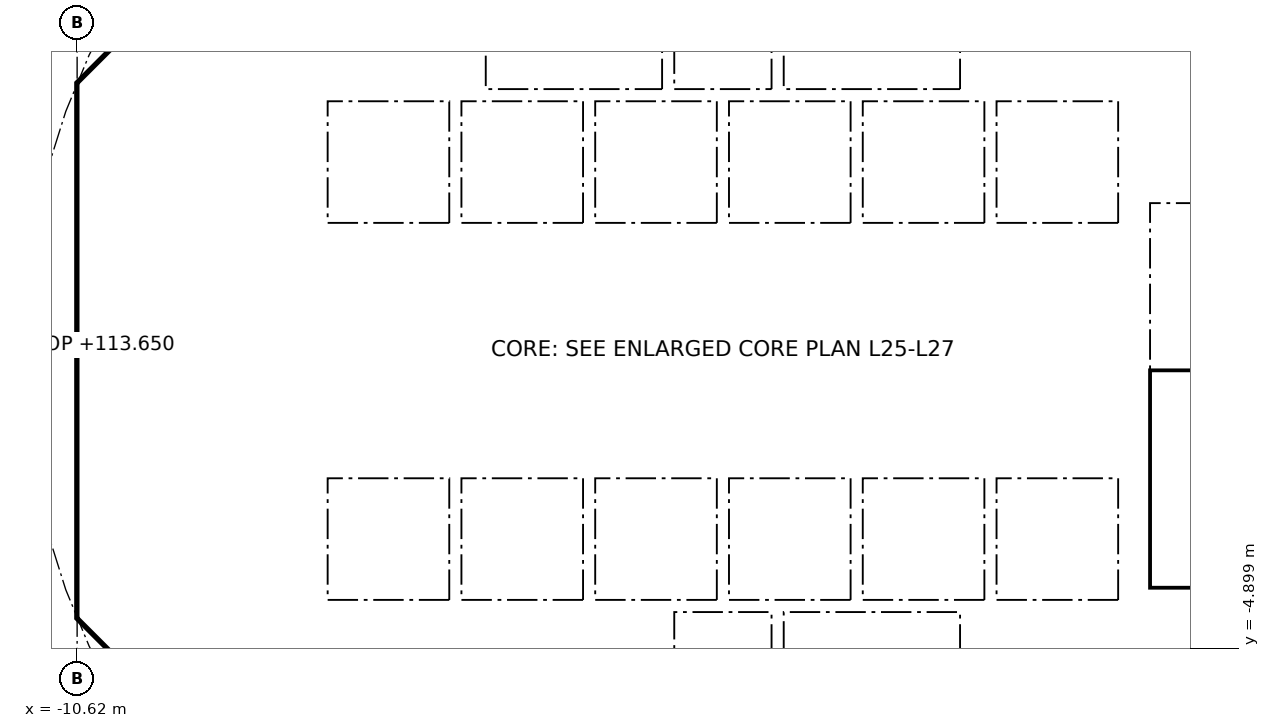
"""IFC4 building model, lengths in metres.
Left out: names, types, materials, properties, quantities, classifications, styles, units other than length and angle.
Written with IfcOpenShell. Run it as: python <this file> out.ifc"""

import sys

from ifc_helpers import new_model, si_unit, direction, frame, frame_2d, origin, place, context, subcontext, project, spatial, polyline, rectangle, outline, extrude, element, fill, save


model = new_model("IFC4")
c1 = context("Model", 3, precision=1e-05, world=origin(), true_north=direction((0.0, 1.0)))
c2 = subcontext(c1, "Body", "Model", "MODEL_VIEW")
j1 = project(units=[si_unit("LENGTHUNIT", "METRE"), si_unit("PLANEANGLEUNIT", "RADIAN")], contexts=[c1])
p1 = place(None, origin())
s1 = spatial("IfcSite", under=j1, at=p1, CompositionType="ELEMENT")
p2 = place(p1, origin())
s2 = spatial("IfcBuilding", under=s1, at=p2, CompositionType="ELEMENT")
p3 = place(p2, frame((0.0, 0.0, 110.3)))
s3 = spatial("IfcBuildingStorey", under=s2, at=p3, CompositionType="ELEMENT", Elevation=110.3)
p4 = place(p3, frame((9.988, 4.613, 0.0), z_axis=(0.0, 0.0, 1.0), x_axis=(-0.707106781187, 0.707106781187, 0.0)))
e1 = element("IfcWall", 1, at=p4, inside=s3, PredefinedType="SHEAR", context=c2, shape_type="SweptSolid", body=[
    extrude(rectangle(XDim=7.602, YDim=0.6, at=frame_2d((3.801, 0.0))), origin(), (0.0, 0.0, 1.0), 3.35),
])
p5 = place(p4, frame((3.201, 0.0, 0.0)))
e2 = element("IfcOpeningElement", 2, at=p5, cuts=e1, PredefinedType="OPENING", context=c2, shape_type="SweptSolid", body=[
    extrude(rectangle(XDim=1.2, YDim=2.1, at=frame_2d((0.6, 1.05))), frame((0.0, 0.31, 0.0), z_axis=(0.0, -1.0, 0.0), x_axis=(1.0, 0.0, 0.0)), (0.0, 0.0, 1.0), 0.62),
])
p6 = place(p3, frame((-4.613, 9.988, 0.0), z_axis=(0.0, 0.0, 1.0), x_axis=(-0.707106781187, -0.707106781187, 0.0)))
e3 = element("IfcWall", 3, at=p6, inside=s3, PredefinedType="SHEAR", context=c2, shape_type="SweptSolid", body=[
    extrude(rectangle(XDim=7.602, YDim=0.6, at=frame_2d((3.801, 0.0))), origin(), (0.0, 0.0, 1.0), 3.35),
])
p7 = place(p6, frame((0.351, 0.0, 0.0)))
e4 = element("IfcOpeningElement", 4, at=p7, cuts=e3, PredefinedType="OPENING", context=c2, shape_type="SweptSolid", body=[
    extrude(rectangle(XDim=1.1, YDim=2.1, at=frame_2d((0.55, 1.05))), frame((0.0, 0.31, 0.0), z_axis=(0.0, -1.0, 0.0), x_axis=(1.0, 0.0, 0.0)), (0.0, 0.0, 1.0), 0.62),
])
p8 = place(p3, frame((-10.325, 3.801, 0.0), z_axis=(0.0, 0.0, 1.0), x_axis=(0.0, -1.0, 0.0)))
e5 = element("IfcWall", 5, at=p8, inside=s3, PredefinedType="SHEAR", context=c2, shape_type="SweptSolid", body=[
    extrude(rectangle(XDim=7.602, YDim=0.6, at=frame_2d((3.801, 0.0))), origin(), (0.0, 0.0, 1.0), 3.35),
])
p9 = place(p8, frame((0.651, 0.0, 0.0)))
e6 = element("IfcOpeningElement", 6, at=p9, cuts=e5, PredefinedType="OPENING", context=c2, shape_type="SweptSolid", body=[
    extrude(rectangle(XDim=1.5, YDim=2.1, at=frame_2d((0.75, 1.05))), frame((0.0, 0.31, 0.0), z_axis=(0.0, -1.0, 0.0), x_axis=(1.0, 0.0, 0.0)), (0.0, 0.0, 1.0), 0.62),
])
p10 = place(p8, frame((5.451, 0.0, 0.0)))
e7 = element("IfcOpeningElement", 7, at=p10, cuts=e5, PredefinedType="OPENING", context=c2, shape_type="SweptSolid", body=[
    extrude(rectangle(XDim=1.5, YDim=2.1, at=frame_2d((0.75, 1.05))), frame((0.0, 0.31, 0.0), z_axis=(0.0, -1.0, 0.0), x_axis=(1.0, 0.0, 0.0)), (0.0, 0.0, 1.0), 0.62),
])
p11 = place(p3, frame((-9.988, -4.613, 0.0), z_axis=(0.0, 0.0, 1.0), x_axis=(0.707106781187, -0.707106781187, 0.0)))
e8 = element("IfcWall", 8, at=p11, inside=s3, PredefinedType="SHEAR", context=c2, shape_type="SweptSolid", body=[
    extrude(rectangle(XDim=7.602, YDim=0.6, at=frame_2d((3.801, 0.0))), origin(), (0.0, 0.0, 1.0), 3.35),
])
p12 = place(p11, frame((6.151, 0.0, 0.0)))
e9 = element("IfcOpeningElement", 9, at=p12, cuts=e8, PredefinedType="OPENING", context=c2, shape_type="SweptSolid", body=[
    extrude(rectangle(XDim=1.1, YDim=2.1, at=frame_2d((0.55, 1.05))), frame((0.0, 0.31, 0.0), z_axis=(0.0, -1.0, 0.0), x_axis=(1.0, 0.0, 0.0)), (0.0, 0.0, 1.0), 0.62),
])
p13 = place(p3, frame((4.613, -9.988, 0.0), z_axis=(0.0, 0.0, 1.0), x_axis=(0.707106781187, 0.707106781187, 0.0)))
e10 = element("IfcWall", 10, at=p13, inside=s3, PredefinedType="SHEAR", context=c2, shape_type="SweptSolid", body=[
    extrude(rectangle(XDim=7.602, YDim=0.6, at=frame_2d((3.801, 0.0))), origin(), (0.0, 0.0, 1.0), 3.35),
])
p14 = place(p13, frame((3.201, 0.0, 0.0)))
e11 = element("IfcOpeningElement", 11, at=p14, cuts=e10, PredefinedType="OPENING", context=c2, shape_type="SweptSolid", body=[
    extrude(rectangle(XDim=1.2, YDim=2.1, at=frame_2d((0.6, 1.05))), frame((0.0, 0.31, 0.0), z_axis=(0.0, -1.0, 0.0), x_axis=(1.0, 0.0, 0.0)), (0.0, 0.0, 1.0), 0.62),
])
p15 = place(p3, frame((-5.8, 4.3, 0.0), z_axis=(0.0, 0.0, 1.0), x_axis=(0.0, 1.0, 0.0)))
e12 = element("IfcWall", 12, at=p15, inside=s3, PredefinedType="PARTITIONING", context=c2, shape_type="SweptSolid", body=[
    extrude(rectangle(XDim=3.927, YDim=0.15, at=frame_2d((1.963, 0.0))), origin(), (0.0, 0.0, 1.0), 3.35),
])
p16 = place(p15, frame((0.413, 0.0, 0.0)))
e13 = element("IfcOpeningElement", 13, at=p16, cuts=e12, PredefinedType="OPENING", context=c2, shape_type="SweptSolid", body=[
    extrude(rectangle(XDim=0.9, YDim=2.1, at=frame_2d((0.45, 1.05))), frame((0.0, 0.085, 0.0), z_axis=(0.0, -1.0, 0.0), x_axis=(1.0, 0.0, 0.0)), (0.0, 0.0, 1.0), 0.17),
])
p17 = place(p15, frame((2.489, 0.0, 0.0)))
e14 = element("IfcOpeningElement", 14, at=p17, cuts=e12, PredefinedType="OPENING", context=c2, shape_type="SweptSolid", body=[
    extrude(rectangle(XDim=0.9, YDim=2.1, at=frame_2d((0.45, 1.05))), frame((0.0, 0.085, 0.0), z_axis=(0.0, -1.0, 0.0), x_axis=(1.0, 0.0, 0.0)), (0.0, 0.0, 1.0), 0.17),
])
p18 = place(p3, frame((4.0, 4.3, 0.0), z_axis=(0.0, 0.0, 1.0), x_axis=(0.0, 1.0, 0.0)))
e15 = element("IfcWall", 15, at=p18, inside=s3, PredefinedType="SOLIDWALL", context=c2, shape_type="SweptSolid", body=[
    extrude(rectangle(XDim=2.2, YDim=0.2, at=frame_2d((1.1, 0.0))), origin(), (0.0, 0.0, 1.0), 3.35),
])
p19 = place(p18, frame((0.55, 0.0, 0.0)))
e16 = element("IfcOpeningElement", 16, at=p19, cuts=e15, PredefinedType="OPENING", context=c2, shape_type="SweptSolid", body=[
    extrude(rectangle(XDim=1.1, YDim=2.1, at=frame_2d((0.55, 1.05))), frame((0.0, 0.11, 0.0), z_axis=(0.0, -1.0, 0.0), x_axis=(1.0, 0.0, 0.0)), (0.0, 0.0, 1.0), 0.22),
])
p20 = place(p3, frame((-4.0, 4.3, 0.0), z_axis=(0.0, 0.0, 1.0), x_axis=(0.0, 1.0, 0.0)))
e17 = element("IfcWall", 17, at=p20, inside=s3, PredefinedType="SOLIDWALL", context=c2, shape_type="SweptSolid", body=[
    extrude(rectangle(XDim=2.2, YDim=0.2, at=frame_2d((1.1, 0.0))), origin(), (0.0, 0.0, 1.0), 3.35),
])
p21 = place(p20, frame((0.55, 0.0, 0.0)))
e18 = element("IfcOpeningElement", 18, at=p21, cuts=e17, PredefinedType="OPENING", context=c2, shape_type="SweptSolid", body=[
    extrude(rectangle(XDim=1.1, YDim=2.1, at=frame_2d((0.55, 1.05))), frame((0.0, 0.11, 0.0), z_axis=(0.0, -1.0, 0.0), x_axis=(1.0, 0.0, 0.0)), (0.0, 0.0, 1.0), 0.22),
])
p22 = place(p3, frame((-6.7, 2.0, 0.0), z_axis=(0.0, 0.0, 1.0), x_axis=(1.0, 0.0, 0.0)))
e19 = element("IfcWall", 19, at=p22, inside=s3, PredefinedType="SOLIDWALL", context=c2, shape_type="SweptSolid", body=[
    extrude(rectangle(XDim=13.4, YDim=0.2, at=frame_2d((6.7, 0.0))), origin(), (0.0, 0.0, 1.0), 3.35),
])
p23 = place(p22, frame((0.65, 0.0, 0.0)))
e20 = element("IfcOpeningElement", 20, at=p23, cuts=e19, PredefinedType="OPENING", context=c2, shape_type="SweptSolid", body=[
    extrude(rectangle(XDim=1.1, YDim=2.1, at=frame_2d((0.55, 1.05))), frame((0.0, 0.11, 0.0), z_axis=(0.0, -1.0, 0.0), x_axis=(1.0, 0.0, 0.0)), (0.0, 0.0, 1.0), 0.22),
])
p24 = place(p22, frame((2.85, 0.0, 0.0)))
e21 = element("IfcOpeningElement", 21, at=p24, cuts=e19, PredefinedType="OPENING", context=c2, shape_type="SweptSolid", body=[
    extrude(rectangle(XDim=1.1, YDim=2.1, at=frame_2d((0.55, 1.05))), frame((0.0, 0.11, 0.0), z_axis=(0.0, -1.0, 0.0), x_axis=(1.0, 0.0, 0.0)), (0.0, 0.0, 1.0), 0.22),
])
p25 = place(p22, frame((5.05, 0.0, 0.0)))
e22 = element("IfcOpeningElement", 22, at=p25, cuts=e19, PredefinedType="OPENING", context=c2, shape_type="SweptSolid", body=[
    extrude(rectangle(XDim=1.1, YDim=2.1, at=frame_2d((0.55, 1.05))), frame((0.0, 0.11, 0.0), z_axis=(0.0, -1.0, 0.0), x_axis=(1.0, 0.0, 0.0)), (0.0, 0.0, 1.0), 0.22),
])
p26 = place(p3, frame((6.7, 4.0, 0.0), z_axis=(0.0, 0.0, 1.0), x_axis=(1.0, 0.0, 0.0)))
e23 = element("IfcWall", 23, at=p26, inside=s3, PredefinedType="SOLIDWALL", context=c2, shape_type="SweptSolid", body=[
    extrude(rectangle(XDim=3.325, YDim=0.2, at=frame_2d((1.662, 0.0))), origin(), (0.0, 0.0, 1.0), 3.35),
])
p27 = place(p26, frame((1.25, 0.0, 0.0)))
e24 = element("IfcOpeningElement", 24, at=p27, cuts=e23, PredefinedType="OPENING", context=c2, shape_type="SweptSolid", body=[
    extrude(rectangle(XDim=1.1, YDim=2.1, at=frame_2d((0.55, 1.05))), frame((0.0, 0.11, 0.0), z_axis=(0.0, -1.0, 0.0), x_axis=(1.0, 0.0, 0.0)), (0.0, 0.0, 1.0), 0.22),
])
p28 = place(p3, frame((-5.8, -8.227, 0.0), z_axis=(0.0, 0.0, 1.0), x_axis=(0.0, 1.0, 0.0)))
e25 = element("IfcWall", 25, at=p28, inside=s3, PredefinedType="PARTITIONING", context=c2, shape_type="SweptSolid", body=[
    extrude(rectangle(XDim=3.927, YDim=0.15, at=frame_2d((1.963, 0.0))), origin(), (0.0, 0.0, 1.0), 3.35),
])
p29 = place(p28, frame((2.615, 0.0, 0.0)))
e26 = element("IfcOpeningElement", 26, at=p29, cuts=e25, PredefinedType="OPENING", context=c2, shape_type="SweptSolid", body=[
    extrude(rectangle(XDim=0.9, YDim=2.1, at=frame_2d((0.45, 1.05))), frame((0.0, 0.085, 0.0), z_axis=(0.0, -1.0, 0.0), x_axis=(1.0, 0.0, 0.0)), (0.0, 0.0, 1.0), 0.17),
])
p30 = place(p28, frame((0.539, 0.0, 0.0)))
e27 = element("IfcOpeningElement", 27, at=p30, cuts=e25, PredefinedType="OPENING", context=c2, shape_type="SweptSolid", body=[
    extrude(rectangle(XDim=0.9, YDim=2.1, at=frame_2d((0.45, 1.05))), frame((0.0, 0.085, 0.0), z_axis=(0.0, -1.0, 0.0), x_axis=(1.0, 0.0, 0.0)), (0.0, 0.0, 1.0), 0.17),
])
p31 = place(p3, frame((4.0, -6.5, 0.0), z_axis=(0.0, 0.0, 1.0), x_axis=(0.0, 1.0, 0.0)))
e28 = element("IfcWall", 28, at=p31, inside=s3, PredefinedType="SOLIDWALL", context=c2, shape_type="SweptSolid", body=[
    extrude(rectangle(XDim=2.2, YDim=0.2, at=frame_2d((1.1, 0.0))), origin(), (0.0, 0.0, 1.0), 3.35),
])
p32 = place(p31, frame((0.55, 0.0, 0.0)))
e29 = element("IfcOpeningElement", 29, at=p32, cuts=e28, PredefinedType="OPENING", context=c2, shape_type="SweptSolid", body=[
    extrude(rectangle(XDim=1.1, YDim=2.1, at=frame_2d((0.55, 1.05))), frame((0.0, 0.11, 0.0), z_axis=(0.0, -1.0, 0.0), x_axis=(1.0, 0.0, 0.0)), (0.0, 0.0, 1.0), 0.22),
])
p33 = place(p3, frame((-4.0, -6.5, 0.0), z_axis=(0.0, 0.0, 1.0), x_axis=(0.0, 1.0, 0.0)))
e30 = element("IfcWall", 30, at=p33, inside=s3, PredefinedType="SOLIDWALL", context=c2, shape_type="SweptSolid", body=[
    extrude(rectangle(XDim=2.2, YDim=0.2, at=frame_2d((1.1, 0.0))), origin(), (0.0, 0.0, 1.0), 3.35),
])
p34 = place(p33, frame((0.65, 0.0, 0.0)))
e31 = element("IfcOpeningElement", 31, at=p34, cuts=e30, PredefinedType="OPENING", context=c2, shape_type="SweptSolid", body=[
    extrude(rectangle(XDim=0.9, YDim=2.1, at=frame_2d((0.45, 1.05))), frame((0.0, 0.11, 0.0), z_axis=(0.0, -1.0, 0.0), x_axis=(1.0, 0.0, 0.0)), (0.0, 0.0, 1.0), 0.22),
])
p35 = place(p3, frame((-6.7, -2.0, 0.0), z_axis=(0.0, 0.0, 1.0), x_axis=(1.0, 0.0, 0.0)))
e32 = element("IfcWall", 32, at=p35, inside=s3, PredefinedType="SOLIDWALL", context=c2, shape_type="SweptSolid", body=[
    extrude(rectangle(XDim=13.4, YDim=0.2, at=frame_2d((6.7, 0.0))), origin(), (0.0, 0.0, 1.0), 3.35),
])
p36 = place(p35, frame((0.65, 0.0, 0.0)))
e33 = element("IfcOpeningElement", 33, at=p36, cuts=e32, PredefinedType="OPENING", context=c2, shape_type="SweptSolid", body=[
    extrude(rectangle(XDim=1.1, YDim=2.1, at=frame_2d((0.55, 1.05))), frame((0.0, 0.11, 0.0), z_axis=(0.0, -1.0, 0.0), x_axis=(1.0, 0.0, 0.0)), (0.0, 0.0, 1.0), 0.22),
])
p37 = place(p35, frame((2.85, 0.0, 0.0)))
e34 = element("IfcOpeningElement", 34, at=p37, cuts=e32, PredefinedType="OPENING", context=c2, shape_type="SweptSolid", body=[
    extrude(rectangle(XDim=1.1, YDim=2.1, at=frame_2d((0.55, 1.05))), frame((0.0, 0.11, 0.0), z_axis=(0.0, -1.0, 0.0), x_axis=(1.0, 0.0, 0.0)), (0.0, 0.0, 1.0), 0.22),
])
p38 = place(p3, origin())
e35 = element("IfcWall", 35, at=p38, inside=s3, PredefinedType="SHEAR", context=c2, shape_type="SweptSolid", body=[
    extrude(outline(polyline([(-10.625, -3.801), (-10.025, -3.801), (-10.025, -4.152), (-9.776, -4.401), (-10.2, -4.825), (-10.625, -4.401), (-10.625, -3.801)])), origin(), (0.0, 0.0, 1.0), 3.35),
])
p39 = place(p3, origin())
e36 = element("IfcWall", 36, at=p39, inside=s3, PredefinedType="SHEAR", context=c2, shape_type="SweptSolid", body=[
    extrude(outline(polyline([(-10.2, 4.825), (-9.776, 4.401), (-10.025, 4.152), (-10.025, 3.801), (-10.625, 3.801), (-10.625, 4.401), (-10.2, 4.825)])), origin(), (0.0, 0.0, 1.0), 3.35),
])
for number, where, z_axis, x_axis in (
    (37, (-10.025, -4.0, 0.0), (0.0, 0.0, 1.0), (1.0, 0.0, 0.0)),
    (38, (-10.025, 4.0, 0.0), (0.0, 0.0, 1.0), (1.0, 0.0, 0.0)),
):
    element("IfcWall", number, at=place(p3, frame(where, z_axis=z_axis, x_axis=x_axis)), inside=s3, PredefinedType="PARTITIONING", context=c2, shape_type="SweptSolid", body=[
        extrude(rectangle(XDim=3.325, YDim=0.2, at=frame_2d((1.662, 0.0))), origin(), (0.0, 0.0, 1.0), 3.35),
    ])
for number, where, z_axis, x_axis in (
    (39, (-0.9, -6.5, 0.0), (0.0, 0.0, 1.0), (0.0, 1.0, 0.0)),
    (40, (0.9, -6.5, 0.0), (0.0, 0.0, 1.0), (0.0, 1.0, 0.0)),
):
    element("IfcWall", number, at=place(p3, frame(where, z_axis=z_axis, x_axis=x_axis)), inside=s3, PredefinedType="SOLIDWALL", context=c2, shape_type="SweptSolid", body=[
        extrude(rectangle(XDim=2.2, YDim=0.2, at=frame_2d((1.1, 0.0))), origin(), (0.0, 0.0, 1.0), 3.35),
    ])
p40 = place(p3, origin())
e41 = element("IfcWall", 41, at=p40, inside=s3, PredefinedType="SOLIDWALL", context=c2, shape_type="SweptSolid", body=[
    extrude(outline(polyline([(-6.7, -2.1), (-6.5, -2.1), (-6.5, -4.1), (-4.5, -4.1), (-4.5, -2.1), (-4.3, -2.1), (-4.3, -4.1), (-2.3, -4.1), (-2.3, -2.1), (-2.1, -2.1), (-2.1, -4.1), (-0.1, -4.1), (-0.1, -2.1), (0.1, -2.1), (0.1, -4.1), (2.1, -4.1), (2.1, -2.1), (2.3, -2.1), (2.3, -4.1), (4.3, -4.1), (4.3, -2.1), (4.5, -2.1), (4.5, -4.1), (6.5, -4.1), (6.5, -2.1), (6.7, -2.1), (6.7, -4.3), (-6.7, -4.3), (-6.7, -2.1)])), origin(), (0.0, 0.0, 1.0), 3.35),
])
for number, where, z_axis, x_axis in (
    (42, (-0.9, 4.3, 0.0), (0.0, 0.0, 1.0), (0.0, 1.0, 0.0)),
    (43, (0.9, 4.3, 0.0), (0.0, 0.0, 1.0), (0.0, 1.0, 0.0)),
):
    element("IfcWall", number, at=place(p3, frame(where, z_axis=z_axis, x_axis=x_axis)), inside=s3, PredefinedType="SOLIDWALL", context=c2, shape_type="SweptSolid", body=[
        extrude(rectangle(XDim=2.2, YDim=0.2, at=frame_2d((1.1, 0.0))), origin(), (0.0, 0.0, 1.0), 3.35),
    ])
p41 = place(p3, origin())
e44 = element("IfcWall", 44, at=p41, inside=s3, PredefinedType="SOLIDWALL", context=c2, shape_type="SweptSolid", body=[
    extrude(outline(polyline([(-6.5, 2.1), (-6.7, 2.1), (-6.7, 4.3), (6.7, 4.3), (6.7, 2.1), (6.5, 2.1), (6.5, 4.1), (4.5, 4.1), (4.5, 2.1), (4.3, 2.1), (4.3, 4.1), (2.3, 4.1), (2.3, 2.1), (2.1, 2.1), (2.1, 4.1), (0.1, 4.1), (0.1, 2.1), (-0.1, 2.1), (-0.1, 4.1), (-2.1, 4.1), (-2.1, 2.1), (-2.3, 2.1), (-2.3, 4.1), (-4.3, 4.1), (-4.3, 2.1), (-4.5, 2.1), (-4.5, 4.1), (-6.5, 4.1), (-6.5, 2.1)])), origin(), (0.0, 0.0, 1.0), 3.35),
])
p42 = place(p3, origin())
e45 = element("IfcWall", 45, at=p42, inside=s3, PredefinedType="SOLIDWALL", context=c2, shape_type="SweptSolid", body=[
    extrude(outline(polyline([(7.025, -3.9), (6.7, -3.9), (6.7, 3.9), (7.025, 3.9), (7.025, -3.9)])), origin(), (0.0, 0.0, 1.0), 3.35),
])
p43 = place(p3, origin())
e46 = element("IfcWall", 46, at=p43, inside=s3, PredefinedType="SOLIDWALL", context=c2, shape_type="SweptSolid", body=[
    extrude(outline(polyline([(10.025, -4.1), (6.7, -4.1), (6.7, -3.9), (10.025, -3.9), (10.025, -4.1)])), origin(), (0.0, 0.0, 1.0), 3.35),
])
p44 = place(p23, origin())
e47 = element("IfcDoor", 47, at=p44, inside=s3, OperationType="DOUBLE_DOOR_SLIDING", PredefinedType="DOOR", context=c2, shape_type="SweptSolid", body=[
    extrude(rectangle(XDim=1.1, YDim=2.1, at=frame_2d((0.55, 1.05))), frame((0.0, 0.025, 0.0), z_axis=(0.0, -1.0, 0.0), x_axis=(1.0, 0.0, 0.0)), (0.0, 0.0, 1.0), 0.05),
])
fill(e20, e47)
p45 = place(p24, origin())
e48 = element("IfcDoor", 48, at=p45, inside=s3, OperationType="DOUBLE_DOOR_SLIDING", PredefinedType="DOOR", context=c2, shape_type="SweptSolid", body=[
    extrude(rectangle(XDim=1.1, YDim=2.1, at=frame_2d((0.55, 1.05))), frame((0.0, 0.025, 0.0), z_axis=(0.0, -1.0, 0.0), x_axis=(1.0, 0.0, 0.0)), (0.0, 0.0, 1.0), 0.05),
])
fill(e21, e48)
p46 = place(p25, origin())
e49 = element("IfcDoor", 49, at=p46, inside=s3, OperationType="DOUBLE_DOOR_SLIDING", PredefinedType="DOOR", context=c2, shape_type="SweptSolid", body=[
    extrude(rectangle(XDim=1.1, YDim=2.1, at=frame_2d((0.55, 1.05))), frame((0.0, 0.025, 0.0), z_axis=(0.0, -1.0, 0.0), x_axis=(1.0, 0.0, 0.0)), (0.0, 0.0, 1.0), 0.05),
])
fill(e22, e49)
p47 = place(p36, origin())
e50 = element("IfcDoor", 50, at=p47, inside=s3, OperationType="DOUBLE_DOOR_SLIDING", PredefinedType="DOOR", context=c2, shape_type="SweptSolid", body=[
    extrude(rectangle(XDim=1.1, YDim=2.1, at=frame_2d((0.55, 1.05))), frame((0.0, 0.025, 0.0), z_axis=(0.0, -1.0, 0.0), x_axis=(1.0, 0.0, 0.0)), (0.0, 0.0, 1.0), 0.05),
])
fill(e33, e50)
p48 = place(p37, origin())
e51 = element("IfcDoor", 51, at=p48, inside=s3, OperationType="DOUBLE_DOOR_SLIDING", PredefinedType="DOOR", context=c2, shape_type="SweptSolid", body=[
    extrude(rectangle(XDim=1.1, YDim=2.1, at=frame_2d((0.55, 1.05))), frame((0.0, 0.025, 0.0), z_axis=(0.0, -1.0, 0.0), x_axis=(1.0, 0.0, 0.0)), (0.0, 0.0, 1.0), 0.05),
])
fill(e34, e51)
p49 = place(p19, origin())
e52 = element("IfcDoor", 52, at=p49, inside=s3, OperationType="DOUBLE_DOOR_SLIDING", PredefinedType="DOOR", context=c2, shape_type="SweptSolid", body=[
    extrude(rectangle(XDim=1.1, YDim=2.1, at=frame_2d((0.55, 1.05))), frame((0.0, 0.025, 0.0), z_axis=(0.0, -1.0, 0.0), x_axis=(1.0, 0.0, 0.0)), (0.0, 0.0, 1.0), 0.05),
])
fill(e16, e52)
p50 = place(p32, origin())
e53 = element("IfcDoor", 53, at=p50, inside=s3, OperationType="DOUBLE_DOOR_SLIDING", PredefinedType="DOOR", context=c2, shape_type="SweptSolid", body=[
    extrude(rectangle(XDim=1.1, YDim=2.1, at=frame_2d((0.55, 1.05))), frame((0.0, 0.025, 0.0), z_axis=(0.0, -1.0, 0.0), x_axis=(1.0, 0.0, 0.0)), (0.0, 0.0, 1.0), 0.05),
])
fill(e29, e53)
p51 = place(p21, origin())
e54 = element("IfcDoor", 54, at=p51, inside=s3, OperationType="DOUBLE_DOOR_SLIDING", PredefinedType="DOOR", context=c2, shape_type="SweptSolid", body=[
    extrude(rectangle(XDim=1.1, YDim=2.1, at=frame_2d((0.55, 1.05))), frame((0.0, 0.025, 0.0), z_axis=(0.0, -1.0, 0.0), x_axis=(1.0, 0.0, 0.0)), (0.0, 0.0, 1.0), 0.05),
])
fill(e18, e54)
p52 = place(p16, origin())
e55 = element("IfcDoor", 55, at=p52, inside=s3, OperationType="SINGLE_SWING_LEFT", PredefinedType="DOOR", context=c2, shape_type="SweptSolid", body=[
    extrude(rectangle(XDim=0.9, YDim=2.1, at=frame_2d((0.45, 1.05))), frame((0.0, 0.025, 0.0), z_axis=(0.0, -1.0, 0.0), x_axis=(1.0, 0.0, 0.0)), (0.0, 0.0, 1.0), 0.05),
])
fill(e13, e55)
p53 = place(p29, origin())
e56 = element("IfcDoor", 56, at=p53, inside=s3, OperationType="SINGLE_SWING_LEFT", PredefinedType="DOOR", context=c2, shape_type="SweptSolid", body=[
    extrude(rectangle(XDim=0.9, YDim=2.1, at=frame_2d((0.45, 1.05))), frame((0.0, 0.025, 0.0), z_axis=(0.0, -1.0, 0.0), x_axis=(1.0, 0.0, 0.0)), (0.0, 0.0, 1.0), 0.05),
])
fill(e26, e56)
p54 = place(p9, origin())
e57 = element("IfcDoor", 57, at=p54, inside=s3, OperationType="DOUBLE_DOOR_SINGLE_SWING", PredefinedType="DOOR", context=c2, shape_type="SweptSolid", body=[
    extrude(rectangle(XDim=1.5, YDim=2.1, at=frame_2d((0.75, 1.05))), frame((0.0, 0.025, 0.0), z_axis=(0.0, -1.0, 0.0), x_axis=(1.0, 0.0, 0.0)), (0.0, 0.0, 1.0), 0.05),
])
fill(e6, e57)
p55 = place(p10, origin())
e58 = element("IfcDoor", 58, at=p55, inside=s3, OperationType="DOUBLE_DOOR_SINGLE_SWING", PredefinedType="DOOR", context=c2, shape_type="SweptSolid", body=[
    extrude(rectangle(XDim=1.5, YDim=2.1, at=frame_2d((0.75, 1.05))), frame((0.0, 0.025, 0.0), z_axis=(0.0, -1.0, 0.0), x_axis=(1.0, 0.0, 0.0)), (0.0, 0.0, 1.0), 0.05),
])
fill(e7, e58)
save(model, sys.argv[1])
